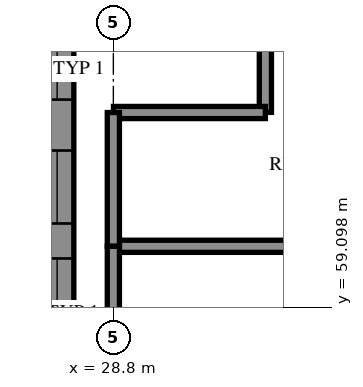
"""IFC4 building model, lengths in metres.
Left out: names, types, materials, properties, quantities, classifications, styles, units other than length and angle.
Written with IfcOpenShell. Run it as: python <this file> out.ifc"""

import sys

from ifc_helpers import new_model, si_unit, direction, frame, frame_2d, origin, place, context, subcontext, project, spatial, polyline, rectangle, outline, extrude, element, fill, save


model = new_model("IFC4")
c1 = context("Model", 3, precision=1e-05, world=origin(), true_north=direction((0.0, 1.0)))
c2 = subcontext(c1, "Body", "Model", "MODEL_VIEW")
j1 = project(units=[si_unit("LENGTHUNIT", "METRE"), si_unit("PLANEANGLEUNIT", "RADIAN")], contexts=[c1])
p1 = place(None, origin())
s1 = spatial("IfcSite", under=j1, at=p1, CompositionType="ELEMENT")
p2 = place(p1, origin())
s2 = spatial("IfcBuilding", under=s1, at=p2, CompositionType="ELEMENT")
p3 = place(p2, frame((0.0, 0.0, 33.8)))
s3 = spatial("IfcBuildingStorey", under=s2, at=p3, CompositionType="ELEMENT", Elevation=33.8)
p4 = place(p3, frame((27.875, 63.875, 0.0), z_axis=(0.0, 0.0, 1.0), x_axis=(0.0, -1.0, 0.0)))
e1 = element("IfcWall", 1, at=p4, inside=s3, PredefinedType="SOLIDWALL", context=c2, shape_type="SweptSolid", body=[
    extrude(outline(polyline([(0.275, -0.275), (7.475, -0.275), (6.925, 0.275), (-0.275, 0.275), (0.275, -0.275)])), origin(), (0.0, 0.0, 1.0), 3.1),
])
p5 = place(p4, frame((3.975, 0.0, 0.7)))
e2 = element("IfcOpeningElement", 2, at=p5, cuts=e1, PredefinedType="OPENING", context=c2, shape_type="SweptSolid", body=[
    extrude(rectangle(XDim=1.8, YDim=2.2, at=frame_2d((0.9, 1.1))), frame((0.0, 0.285, 0.0), z_axis=(0.0, -1.0, 0.0), x_axis=(1.0, 0.0, 0.0)), (0.0, 0.0, 1.0), 0.57),
])
p6 = place(p4, frame((0.362, 0.0, 0.45)))
e3 = element("IfcOpeningElement", 3, at=p6, cuts=e1, PredefinedType="OPENING", context=c2, shape_type="SweptSolid", body=[
    extrude(rectangle(XDim=1.0, YDim=2.5, at=frame_2d((0.5, 1.25))), frame((0.0, 0.285, 0.0), z_axis=(0.0, -1.0, 0.0), x_axis=(1.0, 0.0, 0.0)), (0.0, 0.0, 1.0), 0.57),
])
p7 = place(p4, frame((2.2, 0.0, 0.5)))
e4 = element("IfcOpeningElement", 4, at=p7, cuts=e1, PredefinedType="OPENING", context=c2, shape_type="SweptSolid", body=[
    extrude(rectangle(XDim=1.2, YDim=2.45, at=frame_2d((0.6, 1.225))), frame((0.0, 0.285, 0.0), z_axis=(0.0, -1.0, 0.0), x_axis=(1.0, 0.0, 0.0)), (0.0, 0.0, 1.0), 0.57),
])
p8 = place(p3, frame((28.8, 60.1, 0.0), z_axis=(0.0, 0.0, 1.0), x_axis=(1.0, 0.0, 0.0)))
e5 = element("IfcWall", 5, at=p8, inside=s3, PredefinedType="PARTITIONING", context=c2, shape_type="SweptSolid", body=[
    extrude(rectangle(XDim=24.1, YDim=0.2, at=frame_2d((12.05, 0.0))), origin(), (0.0, 0.0, 1.0), 3.1),
])
p9 = place(p8, frame((4.125, 0.0, 0.0)))
e6 = element("IfcOpeningElement", 6, at=p9, cuts=e5, PredefinedType="OPENING", context=c2, shape_type="SweptSolid", body=[
    extrude(rectangle(XDim=1.0, YDim=2.1, at=frame_2d((0.5, 1.05))), frame((0.0, 0.11, 0.0), z_axis=(0.0, -1.0, 0.0), x_axis=(1.0, 0.0, 0.0)), (0.0, 0.0, 1.0), 0.22),
])
p10 = place(p8, frame((11.62, 0.0, 0.0)))
e7 = element("IfcOpeningElement", 7, at=p10, cuts=e5, PredefinedType="OPENING", context=c2, shape_type="SweptSolid", body=[
    extrude(rectangle(XDim=0.9, YDim=2.1, at=frame_2d((0.45, 1.05))), frame((0.0, 0.11, 0.0), z_axis=(0.0, -1.0, 0.0), x_axis=(1.0, 0.0, 0.0)), (0.0, 0.0, 1.0), 0.22),
])
p11 = place(p8, frame((14.8, 0.0, 0.0)))
e8 = element("IfcOpeningElement", 8, at=p11, cuts=e5, PredefinedType="OPENING", context=c2, shape_type="SweptSolid", body=[
    extrude(rectangle(XDim=0.9, YDim=2.1, at=frame_2d((0.45, 1.05))), frame((0.0, 0.11, 0.0), z_axis=(0.0, -1.0, 0.0), x_axis=(1.0, 0.0, 0.0)), (0.0, 0.0, 1.0), 0.22),
])
p12 = place(p8, frame((18.835, 0.0, 0.0)))
e9 = element("IfcOpeningElement", 9, at=p12, cuts=e5, PredefinedType="OPENING", context=c2, shape_type="SweptSolid", body=[
    extrude(rectangle(XDim=1.0, YDim=2.1, at=frame_2d((0.5, 1.05))), frame((0.0, 0.11, 0.0), z_axis=(0.0, -1.0, 0.0), x_axis=(1.0, 0.0, 0.0)), (0.0, 0.0, 1.0), 0.22),
])
p13 = place(p8, frame((22.854, 0.0, 0.0)))
e10 = element("IfcOpeningElement", 10, at=p13, cuts=e5, PredefinedType="OPENING", context=c2, shape_type="SweptSolid", body=[
    extrude(rectangle(XDim=1.0, YDim=2.1, at=frame_2d((0.5, 1.05))), frame((0.0, 0.11, 0.0), z_axis=(0.0, -1.0, 0.0), x_axis=(1.0, 0.0, 0.0)), (0.0, 0.0, 1.0), 0.22),
])
p14 = place(p3, frame((31.3, 62.302, 0.0), z_axis=(0.0, 0.0, 1.0), x_axis=(0.0, 1.0, 0.0)))
e11 = element("IfcWall", 11, at=p14, inside=s3, PredefinedType="PARTITIONING", context=c2, shape_type="SweptSolid", body=[
    extrude(rectangle(XDim=2.598, YDim=0.2, at=frame_2d((1.299, 0.0))), origin(), (0.0, 0.0, 1.0), 3.1),
])
p15 = place(p3, frame((28.802, 62.3, 0.0), z_axis=(0.0, 0.0, 1.0), x_axis=(1.0, 0.0, 0.0)))
e12 = element("IfcWall", 12, at=p15, inside=s3, PredefinedType="PARTITIONING", context=c2, shape_type="SweptSolid", body=[
    extrude(rectangle(XDim=2.498, YDim=0.2, at=frame_2d((1.249, 0.0))), origin(), (0.0, 0.0, 1.0), 3.1),
])
p16 = place(p3, frame((28.8, 60.1, 0.0), z_axis=(0.0, 0.0, 1.0), x_axis=(0.0, 1.0, 0.0)))
e13 = element("IfcWall", 13, at=p16, inside=s3, PredefinedType="PARTITIONING", context=c2, shape_type="SweptSolid", body=[
    extrude(rectangle(XDim=2.2, YDim=0.2, at=frame_2d((1.1, 0.0))), origin(), (0.0, 0.0, 1.0), 2.6),
])
p17 = place(p3, frame((28.8, 58.2, 0.0), z_axis=(0.0, 0.0, 1.0), x_axis=(0.0, 1.0, 0.0)))
e14 = element("IfcWall", 14, at=p17, inside=s3, PredefinedType="PARTITIONING", context=c2, shape_type="SweptSolid", body=[
    extrude(rectangle(XDim=1.9, YDim=0.2, at=frame_2d((0.95, 0.0))), origin(), (0.0, 0.0, 1.0), 2.6),
])
p18 = place(p5, origin())
e15 = element("IfcWindow", 15, at=p18, inside=s3, PartitioningType="SINGLE_PANEL", PredefinedType="WINDOW", context=c2, shape_type="SweptSolid", body=[
    extrude(rectangle(XDim=1.8, YDim=2.2, at=frame_2d((0.9, 1.1))), frame((0.0, 0.155, 0.0), z_axis=(0.0, -1.0, 0.0), x_axis=(1.0, 0.0, 0.0)), (0.0, 0.0, 1.0), 0.06),
])
fill(e2, e15)
p19 = place(p6, origin())
e16 = element("IfcWindow", 16, at=p19, inside=s3, PartitioningType="SINGLE_PANEL", PredefinedType="WINDOW", context=c2, shape_type="SweptSolid", body=[
    extrude(rectangle(XDim=1.0, YDim=2.5, at=frame_2d((0.5, 1.25))), frame((0.0, 0.155, 0.0), z_axis=(0.0, -1.0, 0.0), x_axis=(1.0, 0.0, 0.0)), (0.0, 0.0, 1.0), 0.06),
])
fill(e3, e16)
p20 = place(p7, origin())
e17 = element("IfcWindow", 17, at=p20, inside=s3, PartitioningType="SINGLE_PANEL", PredefinedType="WINDOW", context=c2, shape_type="SweptSolid", body=[
    extrude(rectangle(XDim=1.2, YDim=2.45, at=frame_2d((0.6, 1.225))), frame((0.0, 0.155, 0.0), z_axis=(0.0, -1.0, 0.0), x_axis=(1.0, 0.0, 0.0)), (0.0, 0.0, 1.0), 0.06),
])
fill(e4, e17)
save(model, sys.argv[1])
